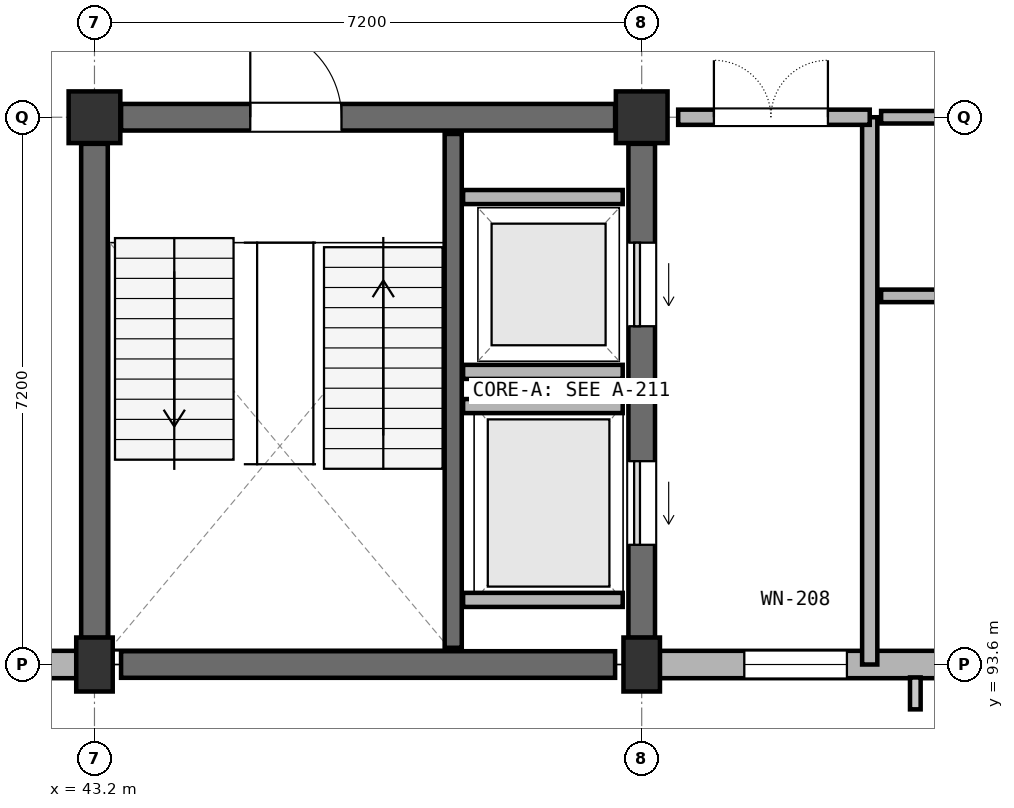
"""IFC4 building model, lengths in metres.
Left out: names, types, materials, properties, quantities, classifications, styles, units other than length and angle.
Written with IfcOpenShell. Run it as: python <this file> out.ifc"""

import sys

from ifc_helpers import new_model, si_unit, direction, frame, frame_2d, origin, origin_2d, place, context, subcontext, project, spatial, rectangle, extrude, element, fill, save


model = new_model("IFC4")
c1 = context("Model", 3, precision=1e-05, world=origin(), true_north=direction((0.0, 1.0)))
c2 = subcontext(c1, "Body", "Model", "MODEL_VIEW")
j1 = project(units=[si_unit("LENGTHUNIT", "METRE"), si_unit("PLANEANGLEUNIT", "RADIAN")], contexts=[c1])
p1 = place(None, origin())
s1 = spatial("IfcSite", under=j1, at=p1, CompositionType="ELEMENT")
p2 = place(p1, origin())
s2 = spatial("IfcBuilding", under=s1, at=p2, CompositionType="ELEMENT")
p3 = place(p2, frame((0.0, 0.0, 26.4)))
s3 = spatial("IfcBuildingStorey", under=s2, at=p3, CompositionType="ELEMENT", Elevation=26.4)
p4 = place(p3, frame((43.2, 93.6, 0.0), z_axis=(0.0, 0.0, 1.0), x_axis=(1.0, 0.0, 0.0)))
e1 = element("IfcColumn", 1, at=p4, inside=s3, PredefinedType="COLUMN", context=c2, shape_type="SweptSolid", body=[
    extrude(rectangle(XDim=0.48, YDim=0.71, at=origin_2d()), origin(), (0.0, 0.0, 1.0), 3.9),
])
p5 = place(p3, frame((43.2, 100.8, 0.0), z_axis=(0.0, 0.0, 1.0), x_axis=(1.0, 0.0, 0.0)))
e2 = element("IfcColumn", 2, at=p5, inside=s3, PredefinedType="COLUMN", context=c2, shape_type="SweptSolid", body=[
    extrude(rectangle(XDim=0.68, YDim=0.68, at=origin_2d()), origin(), (0.0, 0.0, 1.0), 3.9),
])
p6 = place(p3, frame((50.4, 93.6, 0.0), z_axis=(0.0, 0.0, 1.0), x_axis=(1.0, 0.0, 0.0)))
e3 = element("IfcColumn", 3, at=p6, inside=s3, PredefinedType="COLUMN", context=c2, shape_type="SweptSolid", body=[
    extrude(rectangle(XDim=0.48, YDim=0.71, at=origin_2d()), origin(), (0.0, 0.0, 1.0), 3.9),
])
p7 = place(p3, frame((50.4, 100.8, 0.0), z_axis=(0.0, 0.0, 1.0), x_axis=(1.0, 0.0, 0.0)))
e4 = element("IfcColumn", 4, at=p7, inside=s3, PredefinedType="COLUMN", context=c2, shape_type="SweptSolid", body=[
    extrude(rectangle(XDim=0.68, YDim=0.68, at=origin_2d()), origin(), (0.0, 0.0, 1.0), 3.9),
])
p8 = place(p3, frame((43.55, 93.6, 0.0), z_axis=(0.0, 0.0, 1.0), x_axis=(1.0, 0.0, 0.0)))
e5 = element("IfcWall", 5, at=p8, inside=s3, PredefinedType="SHEAR", context=c2, shape_type="SweptSolid", body=[
    extrude(rectangle(XDim=6.5, YDim=0.35, at=frame_2d((3.25, 0.0))), origin(), (0.0, 0.0, 1.0), 3.9),
])
p9 = place(p3, frame((50.4, 93.95, 0.0), z_axis=(0.0, 0.0, 1.0), x_axis=(0.0, 1.0, 0.0)))
e6 = element("IfcWall", 6, at=p9, inside=s3, PredefinedType="SHEAR", context=c2, shape_type="SweptSolid", body=[
    extrude(rectangle(XDim=6.5, YDim=0.35, at=frame_2d((3.25, 0.0))), origin(), (0.0, 0.0, 1.0), 3.9),
])
p10 = place(p9, frame((1.225, 0.0, 0.0)))
e7 = element("IfcOpeningElement", 7, at=p10, cuts=e6, PredefinedType="OPENING", context=c2, shape_type="SweptSolid", body=[
    extrude(rectangle(XDim=1.1, YDim=2.2, at=frame_2d((0.55, 1.1))), frame((0.0, 0.185, 0.0), z_axis=(0.0, -1.0, 0.0), x_axis=(1.0, 0.0, 0.0)), (0.0, 0.0, 1.0), 0.37),
])
p11 = place(p9, frame((4.1, 0.0, 0.0)))
e8 = element("IfcOpeningElement", 8, at=p11, cuts=e6, PredefinedType="OPENING", context=c2, shape_type="SweptSolid", body=[
    extrude(rectangle(XDim=1.1, YDim=2.2, at=frame_2d((0.55, 1.1))), frame((0.0, 0.185, 0.0), z_axis=(0.0, -1.0, 0.0), x_axis=(1.0, 0.0, 0.0)), (0.0, 0.0, 1.0), 0.37),
])
p12 = place(p3, frame((50.05, 100.8, 0.0), z_axis=(0.0, 0.0, 1.0), x_axis=(-1.0, 0.0, 0.0)))
e9 = element("IfcWall", 9, at=p12, inside=s3, PredefinedType="SHEAR", context=c2, shape_type="SweptSolid", body=[
    extrude(rectangle(XDim=6.5, YDim=0.35, at=frame_2d((3.25, 0.0))), origin(), (0.0, 0.0, 1.0), 3.9),
])
p13 = place(p12, frame((3.6, 0.0, 0.0)))
e10 = element("IfcOpeningElement", 10, at=p13, cuts=e9, PredefinedType="OPENING", context=c2, shape_type="SweptSolid", body=[
    extrude(rectangle(XDim=1.2, YDim=2.2, at=frame_2d((0.6, 1.1))), frame((0.0, 0.185, 0.0), z_axis=(0.0, -1.0, 0.0), x_axis=(1.0, 0.0, 0.0)), (0.0, 0.0, 1.0), 0.37),
])
p14 = place(p3, frame((43.2, 100.45, 0.0), z_axis=(0.0, 0.0, 1.0), x_axis=(0.0, -1.0, 0.0)))
e11 = element("IfcWall", 11, at=p14, inside=s3, PredefinedType="SHEAR", context=c2, shape_type="SweptSolid", body=[
    extrude(rectangle(XDim=6.5, YDim=0.35, at=frame_2d((3.25, 0.0))), origin(), (0.0, 0.0, 1.0), 3.9),
])
p15 = place(p3, frame((47.92, 93.82, 0.0), z_axis=(0.0, 0.0, 1.0), x_axis=(0.0, 1.0, 0.0)))
e12 = element("IfcWall", 12, at=p15, inside=s3, PredefinedType="SHEAR", context=c2, shape_type="SweptSolid", body=[
    extrude(rectangle(XDim=6.76, YDim=0.225, at=frame_2d((3.38, 0.0))), origin(), (0.0, 0.0, 1.0), 3.9),
])
for number, where, z_axis, x_axis in (
    (13, (48.05, 94.45, 0.0), (0.0, 0.0, 1.0), (1.0, 0.0, 0.0)),
    (14, (48.05, 97.0, 0.0), (0.0, 0.0, 1.0), (1.0, 0.0, 0.0)),
    (15, (48.05, 97.45, 0.0), (0.0, 0.0, 1.0), (1.0, 0.0, 0.0)),
    (16, (48.05, 99.75, 0.0), (0.0, 0.0, 1.0), (1.0, 0.0, 0.0)),
):
    element("IfcWall", number, at=place(p3, frame(where, z_axis=z_axis, x_axis=x_axis)), inside=s3, PredefinedType="PARTITIONING", context=c2, shape_type="SweptSolid", body=[
        extrude(rectangle(XDim=2.1, YDim=0.185, at=frame_2d((1.05, 0.0))), origin(), (0.0, 0.0, 1.0), 3.9),
    ])
p16 = place(p3, frame((36.238, 93.6, 0.0), z_axis=(0.0, 0.0, 1.0), x_axis=(1.0, 0.0, 0.0)))
e17 = element("IfcWall", 17, at=p16, inside=s3, PredefinedType="SOLIDWALL", context=c2, shape_type="SweptSolid", body=[
    extrude(rectangle(XDim=6.724, YDim=0.36, at=frame_2d((3.362, 0.0))), origin(), (0.0, 0.0, 1.0), 2.74),
])
p17 = place(p16, frame((1.112, 0.0, 0.7)))
e18 = element("IfcOpeningElement", 18, at=p17, cuts=e17, PredefinedType="OPENING", context=c2, shape_type="SweptSolid", body=[
    extrude(rectangle(XDim=1.35, YDim=1.89, at=frame_2d((0.675, 0.945))), frame((0.0, 0.19, 0.0), z_axis=(0.0, -1.0, 0.0), x_axis=(1.0, 0.0, 0.0)), (0.0, 0.0, 1.0), 0.38),
])
p18 = place(p16, frame((4.312, 0.0, 0.7)))
e19 = element("IfcOpeningElement", 19, at=p18, cuts=e17, PredefinedType="OPENING", context=c2, shape_type="SweptSolid", body=[
    extrude(rectangle(XDim=1.05, YDim=1.89, at=frame_2d((0.525, 0.945))), frame((0.0, 0.19, 0.0), z_axis=(0.0, -1.0, 0.0), x_axis=(1.0, 0.0, 0.0)), (0.0, 0.0, 1.0), 0.38),
])
p19 = place(p3, frame((50.638, 93.6, 0.0), z_axis=(0.0, 0.0, 1.0), x_axis=(1.0, 0.0, 0.0)))
e20 = element("IfcWall", 20, at=p19, inside=s3, PredefinedType="SOLIDWALL", context=c2, shape_type="SweptSolid", body=[
    extrude(rectangle(XDim=6.724, YDim=0.36, at=frame_2d((3.362, 0.0))), origin(), (0.0, 0.0, 1.0), 2.74),
])
p20 = place(p19, frame((1.112, 0.0, 0.7)))
e21 = element("IfcOpeningElement", 21, at=p20, cuts=e20, PredefinedType="OPENING", context=c2, shape_type="SweptSolid", body=[
    extrude(rectangle(XDim=1.35, YDim=1.89, at=frame_2d((0.675, 0.945))), frame((0.0, 0.19, 0.0), z_axis=(0.0, -1.0, 0.0), x_axis=(1.0, 0.0, 0.0)), (0.0, 0.0, 1.0), 0.38),
])
p21 = place(p19, frame((4.312, 0.0, 0.7)))
e22 = element("IfcOpeningElement", 22, at=p21, cuts=e20, PredefinedType="OPENING", context=c2, shape_type="SweptSolid", body=[
    extrude(rectangle(XDim=1.05, YDim=1.89, at=frame_2d((0.525, 0.945))), frame((0.0, 0.19, 0.0), z_axis=(0.0, -1.0, 0.0), x_axis=(1.0, 0.0, 0.0)), (0.0, 0.0, 1.0), 0.38),
])
p22 = place(p3, frame((53.4, 93.6, 0.0), z_axis=(0.0, 0.0, 1.0), x_axis=(0.0, 1.0, 0.0)))
e23 = element("IfcWall", 23, at=p22, inside=s3, PredefinedType="PARTITIONING", context=c2, shape_type="SweptSolid", body=[
    extrude(rectangle(XDim=7.2, YDim=0.2, at=frame_2d((3.6, 0.0))), origin(), (0.0, 0.0, 1.0), 2.78),
])
p23 = place(p3, frame((53.4, 100.8, 0.0), z_axis=(0.0, 0.0, 1.0), x_axis=(-1.0, 0.0, 0.0)))
e24 = element("IfcWall", 24, at=p23, inside=s3, PredefinedType="PARTITIONING", context=c2, shape_type="SweptSolid", body=[
    extrude(rectangle(XDim=2.52, YDim=0.2, at=frame_2d((1.26, 0.0))), origin(), (0.0, 0.0, 1.0), 2.78),
])
p24 = place(p23, frame((0.55, 0.0, 0.0)))
e25 = element("IfcOpeningElement", 25, at=p24, cuts=e24, PredefinedType="OPENING", context=c2, shape_type="SweptSolid", body=[
    extrude(rectangle(XDim=1.5, YDim=2.2, at=frame_2d((0.75, 1.1))), frame((0.0, 0.11, 0.0), z_axis=(0.0, -1.0, 0.0), x_axis=(1.0, 0.0, 0.0)), (0.0, 0.0, 1.0), 0.22),
])
p25 = place(p3, frame((56.75, 100.8, 0.0), z_axis=(0.0, 0.0, 1.0), x_axis=(-1.0, 0.0, 0.0)))
e26 = element("IfcWall", 26, at=p25, inside=s3, PredefinedType="PARTITIONING", context=c2, shape_type="SweptSolid", body=[
    extrude(rectangle(XDim=3.2, YDim=0.165, at=frame_2d((1.6, 0.0))), origin(), (0.0, 0.0, 1.0), 2.78),
])
p26 = place(p25, frame((0.95, 0.0, 0.0)))
e27 = element("IfcOpeningElement", 27, at=p26, cuts=e26, PredefinedType="OPENING", context=c2, shape_type="SweptSolid", body=[
    extrude(rectangle(XDim=0.95, YDim=2.15, at=frame_2d((0.475, 1.075))), frame((0.0, 0.093, 0.0), z_axis=(0.0, -1.0, 0.0), x_axis=(1.0, 0.0, 0.0)), (0.0, 0.0, 1.0), 0.185),
])
p27 = place(p3, frame((53.55, 98.45, 0.0), z_axis=(0.0, 0.0, 1.0), x_axis=(1.0, 0.0, 0.0)))
e28 = element("IfcWall", 28, at=p27, inside=s3, PredefinedType="PARTITIONING", context=c2, shape_type="SweptSolid", body=[
    extrude(rectangle(XDim=3.2, YDim=0.165, at=frame_2d((1.6, 0.0))), origin(), (0.0, 0.0, 1.0), 2.78),
])
p28 = place(p10, origin())
e29 = element("IfcDoor", 29, at=p28, inside=s3, OperationType="SLIDING_TO_LEFT", PredefinedType="DOOR", context=c2, shape_type="SweptSolid", body=[
    extrude(rectangle(XDim=1.1, YDim=2.2, at=frame_2d((0.55, 1.1))), frame((0.0, 0.025, 0.0), z_axis=(0.0, -1.0, 0.0), x_axis=(1.0, 0.0, 0.0)), (0.0, 0.0, 1.0), 0.05),
])
fill(e7, e29)
p29 = place(p11, origin())
e30 = element("IfcDoor", 30, at=p29, inside=s3, OperationType="SLIDING_TO_LEFT", PredefinedType="DOOR", context=c2, shape_type="SweptSolid", body=[
    extrude(rectangle(XDim=1.1, YDim=2.2, at=frame_2d((0.55, 1.1))), frame((0.0, 0.025, 0.0), z_axis=(0.0, -1.0, 0.0), x_axis=(1.0, 0.0, 0.0)), (0.0, 0.0, 1.0), 0.05),
])
fill(e8, e30)
p30 = place(p20, origin())
e31 = element("IfcWindow", 31, at=p30, inside=s3, PartitioningType="DOUBLE_PANEL_VERTICAL", PredefinedType="WINDOW", context=c2, shape_type="SweptSolid", body=[
    extrude(rectangle(XDim=1.35, YDim=1.89, at=frame_2d((0.675, 0.945))), frame((0.0, 0.03, 0.0), z_axis=(0.0, -1.0, 0.0), x_axis=(1.0, 0.0, 0.0)), (0.0, 0.0, 1.0), 0.06),
])
fill(e21, e31)
p31 = place(p13, frame((1.2, 0.0, 0.0), z_axis=(0.0, 0.0, 1.0), x_axis=(-1.0, 0.0, 0.0)))
e32 = element("IfcDoor", 32, at=p31, inside=s3, OperationType="SINGLE_SWING_LEFT", PredefinedType="DOOR", context=c2, shape_type="SweptSolid", body=[
    extrude(rectangle(XDim=1.2, YDim=2.2, at=frame_2d((0.6, 1.1))), frame((0.0, 0.025, 0.0), z_axis=(0.0, -1.0, 0.0), x_axis=(1.0, 0.0, 0.0)), (0.0, 0.0, 1.0), 0.05),
])
fill(e10, e32)
p32 = place(p24, frame((1.5, 0.0, 0.0), z_axis=(0.0, 0.0, 1.0), x_axis=(-1.0, 0.0, 0.0)))
e33 = element("IfcDoor", 33, at=p32, inside=s3, OperationType="DOUBLE_DOOR_SINGLE_SWING", PredefinedType="DOOR", context=c2, shape_type="SweptSolid", body=[
    extrude(rectangle(XDim=1.5, YDim=2.2, at=frame_2d((0.75, 1.1))), frame((0.0, 0.025, 0.0), z_axis=(0.0, -1.0, 0.0), x_axis=(1.0, 0.0, 0.0)), (0.0, 0.0, 1.0), 0.05),
])
fill(e25, e33)
save(model, sys.argv[1])
